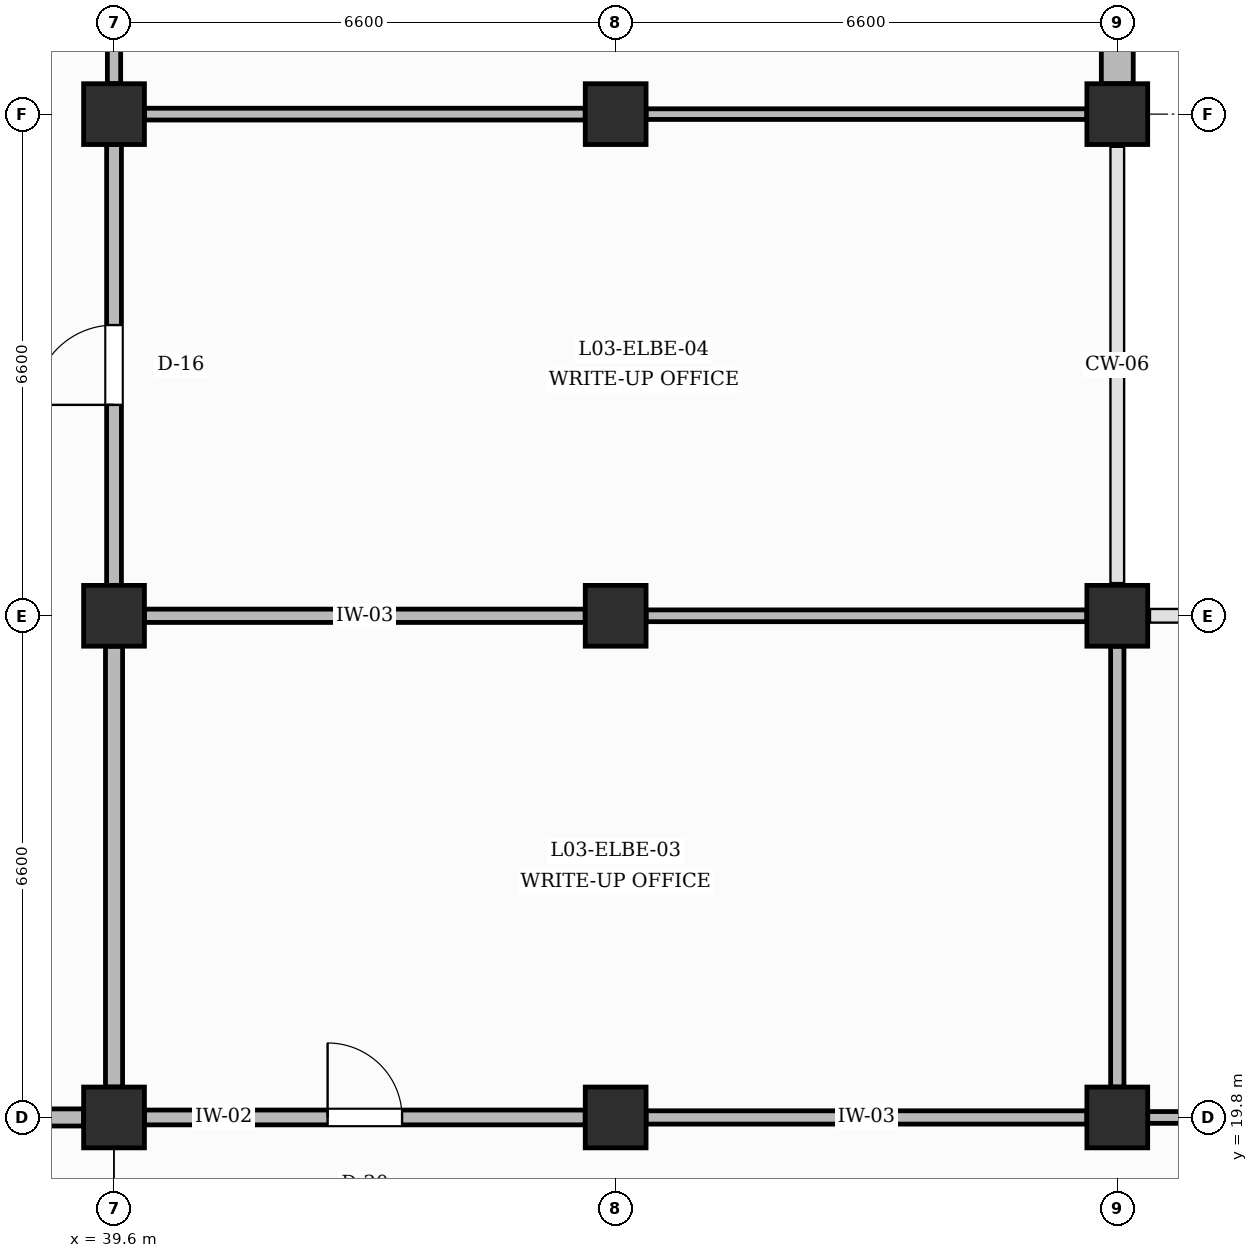
"""IFC4 building model, lengths in metres.
Left out: names, types, materials, properties, quantities, classifications, styles, units other than length and angle.
Written with IfcOpenShell. Run it as: python <this file> out.ifc"""

import sys

from ifc_helpers import new_model, si_unit, direction, frame, frame_2d, origin, origin_2d, place, context, subcontext, project, spatial, rectangle, extrude, element, fill, save


model = new_model("IFC4")
c1 = context("Model", 3, precision=1e-05, world=origin(), true_north=direction((0.0, 1.0)))
c2 = subcontext(c1, "Body", "Model", "MODEL_VIEW")
j1 = project(units=[si_unit("LENGTHUNIT", "METRE"), si_unit("PLANEANGLEUNIT", "RADIAN")], contexts=[c1])
p1 = place(None, origin())
s1 = spatial("IfcSite", under=j1, at=p1, CompositionType="ELEMENT")
p2 = place(p1, origin())
s2 = spatial("IfcBuilding", under=s1, at=p2, CompositionType="ELEMENT")
p3 = place(p2, frame((0.0, 0.0, 14.4)))
s3 = spatial("IfcBuildingStorey", under=s2, at=p3, CompositionType="ELEMENT", Elevation=14.4)
for number, where, z_axis, x_axis in (
    (1, (39.6, 19.8, 0.0), (0.0, 0.0, 1.0), (1.0, 0.0, 0.0)),
    (2, (39.6, 26.4, 0.0), (0.0, 0.0, 1.0), (1.0, 0.0, 0.0)),
    (3, (39.6, 33.0, 0.0), (0.0, 0.0, 1.0), (1.0, 0.0, 0.0)),
    (4, (46.2, 19.8, 0.0), (0.0, 0.0, 1.0), (1.0, 0.0, 0.0)),
    (5, (46.2, 26.4, 0.0), (0.0, 0.0, 1.0), (1.0, 0.0, 0.0)),
    (6, (46.2, 33.0, 0.0), (0.0, 0.0, 1.0), (1.0, 0.0, 0.0)),
    (7, (52.8, 19.8, 0.0), (0.0, 0.0, 1.0), (1.0, 0.0, 0.0)),
    (8, (52.8, 26.4, 0.0), (0.0, 0.0, 1.0), (1.0, 0.0, 0.0)),
    (9, (52.8, 33.0, 0.0), (0.0, 0.0, 1.0), (1.0, 0.0, 0.0)),
):
    element("IfcColumn", number, at=place(p3, frame(where, z_axis=z_axis, x_axis=x_axis)), inside=s3, PredefinedType="COLUMN", context=c2, shape_type="SweptSolid", body=[
        extrude(rectangle(XDim=0.8, YDim=0.8, at=origin_2d()), origin(), (0.0, 0.0, 1.0), 4.2),
    ])
p4 = place(p3, frame((52.8, 33.4, 0.0), z_axis=(0.0, 0.0, 1.0), x_axis=(0.0, 1.0, 0.0)))
e10 = element("IfcWall", 10, at=p4, inside=s3, PredefinedType="SOLIDWALL", context=c2, shape_type="SweptSolid", body=[
    extrude(rectangle(XDim=5.8, YDim=0.42, at=frame_2d((2.9, 0.0))), origin(), (0.0, 0.0, 1.0), 3.26),
])
p5 = place(p4, frame((1.69, 0.0, 0.95)))
e11 = element("IfcOpeningElement", 11, at=p5, cuts=e10, PredefinedType="OPENING", context=c2, shape_type="SweptSolid", body=[
    extrude(rectangle(XDim=2.42, YDim=1.68, at=frame_2d((1.21, 0.84))), frame((0.0, 0.22, 0.0), z_axis=(0.0, -1.0, 0.0), x_axis=(1.0, 0.0, 0.0)), (0.0, 0.0, 1.0), 0.44),
])
p6 = place(p3, frame((33.425, 19.8, 0.0), z_axis=(0.0, 0.0, 1.0), x_axis=(1.0, 0.0, 0.0)))
e12 = element("IfcWall", 12, at=p6, inside=s3, PredefinedType="PARTITIONING", context=c2, shape_type="SweptSolid", body=[
    extrude(rectangle(XDim=5.775, YDim=0.225, at=frame_2d((2.887, 0.0))), origin(), (0.0, 0.0, 1.0), 3.16),
])
p7 = place(p6, frame((2.075, 0.0, 0.0)))
e13 = element("IfcOpeningElement", 13, at=p7, cuts=e12, PredefinedType="OPENING", context=c2, shape_type="SweptSolid", body=[
    extrude(rectangle(XDim=1.6, YDim=2.2, at=frame_2d((0.8, 1.1))), frame((0.0, 0.123, 0.0), z_axis=(0.0, -1.0, 0.0), x_axis=(1.0, 0.0, 0.0)), (0.0, 0.0, 1.0), 0.245),
])
p8 = place(p3, frame((39.6, 20.2, 0.0), z_axis=(0.0, 0.0, 1.0), x_axis=(0.0, 1.0, 0.0)))
e14 = element("IfcWall", 14, at=p8, inside=s3, PredefinedType="PARTITIONING", context=c2, shape_type="SweptSolid", body=[
    extrude(rectangle(XDim=5.8, YDim=0.225, at=frame_2d((2.9, 0.0))), origin(), (0.0, 0.0, 1.0), 3.16),
])
p9 = place(p3, frame((39.6, 26.8, 0.0), z_axis=(0.0, 0.0, 1.0), x_axis=(0.0, 1.0, 0.0)))
e15 = element("IfcWall", 15, at=p9, inside=s3, PredefinedType="PARTITIONING", context=c2, shape_type="SweptSolid", body=[
    extrude(rectangle(XDim=5.8, YDim=0.195, at=frame_2d((2.9, 0.0))), origin(), (0.0, 0.0, 1.0), 3.16),
])
p10 = place(p9, frame((2.375, 0.0, 0.0)))
e16 = element("IfcOpeningElement", 16, at=p10, cuts=e15, PredefinedType="OPENING", context=c2, shape_type="SweptSolid", body=[
    extrude(rectangle(XDim=1.05, YDim=2.15, at=frame_2d((0.525, 1.075))), frame((0.0, 0.107, 0.0), z_axis=(0.0, -1.0, 0.0), x_axis=(1.0, 0.0, 0.0)), (0.0, 0.0, 1.0), 0.215),
])
p11 = place(p3, frame((39.6, 33.4, 0.0), z_axis=(0.0, 0.0, 1.0), x_axis=(0.0, 1.0, 0.0)))
e17 = element("IfcWall", 17, at=p11, inside=s3, PredefinedType="PARTITIONING", context=c2, shape_type="SweptSolid", body=[
    extrude(rectangle(XDim=5.8, YDim=0.175, at=frame_2d((2.9, 0.0))), origin(), (0.0, 0.0, 1.0), 3.16),
])
p12 = place(p11, frame((2.36, 0.0, 0.0)))
e18 = element("IfcOpeningElement", 18, at=p12, cuts=e17, PredefinedType="OPENING", context=c2, shape_type="SweptSolid", body=[
    extrude(rectangle(XDim=1.08, YDim=2.15, at=frame_2d((0.54, 1.075))), frame((0.0, 0.097, 0.0), z_axis=(0.0, -1.0, 0.0), x_axis=(1.0, 0.0, 0.0)), (0.0, 0.0, 1.0), 0.195),
])
p13 = place(p3, frame((40.0, 19.8, 0.0), z_axis=(0.0, 0.0, 1.0), x_axis=(1.0, 0.0, 0.0)))
e19 = element("IfcWall", 19, at=p13, inside=s3, PredefinedType="PARTITIONING", context=c2, shape_type="SweptSolid", body=[
    extrude(rectangle(XDim=5.8, YDim=0.195, at=frame_2d((2.9, 0.0))), origin(), (0.0, 0.0, 1.0), 3.16),
])
p14 = place(p13, frame((2.41, 0.0, 0.0)))
e20 = element("IfcOpeningElement", 20, at=p14, cuts=e19, PredefinedType="OPENING", context=c2, shape_type="SweptSolid", body=[
    extrude(rectangle(XDim=0.98, YDim=2.15, at=frame_2d((0.49, 1.075))), frame((0.0, 0.107, 0.0), z_axis=(0.0, -1.0, 0.0), x_axis=(1.0, 0.0, 0.0)), (0.0, 0.0, 1.0), 0.215),
])
p15 = place(p3, frame((40.0, 26.4, 0.0), z_axis=(0.0, 0.0, 1.0), x_axis=(1.0, 0.0, 0.0)))
e21 = element("IfcWall", 21, at=p15, inside=s3, PredefinedType="PARTITIONING", context=c2, shape_type="SweptSolid", body=[
    extrude(rectangle(XDim=5.8, YDim=0.175, at=frame_2d((2.9, 0.0))), origin(), (0.0, 0.0, 1.0), 3.16),
])
p16 = place(p3, frame((40.0, 33.0, 0.0), z_axis=(0.0, 0.0, 1.0), x_axis=(1.0, 0.0, 0.0)))
e22 = element("IfcWall", 22, at=p16, inside=s3, PredefinedType="PARTITIONING", context=c2, shape_type="SweptSolid", body=[
    extrude(rectangle(XDim=5.8, YDim=0.155, at=frame_2d((2.9, 0.0))), origin(), (0.0, 0.0, 1.0), 3.16),
])
p17 = place(p3, frame((46.6, 19.8, 0.0), z_axis=(0.0, 0.0, 1.0), x_axis=(1.0, 0.0, 0.0)))
e23 = element("IfcWall", 23, at=p17, inside=s3, PredefinedType="PARTITIONING", context=c2, shape_type="SweptSolid", body=[
    extrude(rectangle(XDim=5.8, YDim=0.175, at=frame_2d((2.9, 0.0))), origin(), (0.0, 0.0, 1.0), 3.16),
])
p18 = place(p3, frame((52.8, 20.2, 0.0), z_axis=(0.0, 0.0, 1.0), x_axis=(0.0, 1.0, 0.0)))
e24 = element("IfcWall", 24, at=p18, inside=s3, PredefinedType="PARTITIONING", context=c2, shape_type="SweptSolid", body=[
    extrude(rectangle(XDim=5.8, YDim=0.175, at=frame_2d((2.9, 0.0))), origin(), (0.0, 0.0, 1.0), 3.16),
])
p19 = place(p3, frame((46.6, 26.4, 0.0), z_axis=(0.0, 0.0, 1.0), x_axis=(1.0, 0.0, 0.0)))
e25 = element("IfcWall", 25, at=p19, inside=s3, PredefinedType="PARTITIONING", context=c2, shape_type="SweptSolid", body=[
    extrude(rectangle(XDim=5.8, YDim=0.155, at=frame_2d((2.9, 0.0))), origin(), (0.0, 0.0, 1.0), 3.16),
])
p20 = place(p3, frame((46.6, 33.0, 0.0), z_axis=(0.0, 0.0, 1.0), x_axis=(1.0, 0.0, 0.0)))
e26 = element("IfcWall", 26, at=p20, inside=s3, PredefinedType="PARTITIONING", context=c2, shape_type="SweptSolid", body=[
    extrude(rectangle(XDim=5.8, YDim=0.14, at=frame_2d((2.9, 0.0))), origin(), (0.0, 0.0, 1.0), 3.16),
])
p21 = place(p3, frame((53.2, 19.8, 0.0), z_axis=(0.0, 0.0, 1.0), x_axis=(1.0, 0.0, 0.0)))
e27 = element("IfcWall", 27, at=p21, inside=s3, PredefinedType="PARTITIONING", context=c2, shape_type="SweptSolid", body=[
    extrude(rectangle(XDim=5.8, YDim=0.155, at=frame_2d((2.9, 0.0))), origin(), (0.0, 0.0, 1.0), 3.16),
])
p22 = place(p21, frame((2.25, 0.0, 0.0)))
e28 = element("IfcOpeningElement", 28, at=p22, cuts=e27, PredefinedType="OPENING", context=c2, shape_type="SweptSolid", body=[
    extrude(rectangle(XDim=1.3, YDim=2.3, at=frame_2d((0.65, 1.15))), frame((0.0, 0.087, 0.0), z_axis=(0.0, -1.0, 0.0), x_axis=(1.0, 0.0, 0.0)), (0.0, 0.0, 1.0), 0.175),
])
p23 = place(p14, origin())
e29 = element("IfcDoor", 29, at=p23, inside=s3, OperationType="SINGLE_SWING_LEFT", PredefinedType="DOOR", context=c2, shape_type="SweptSolid", body=[
    extrude(rectangle(XDim=0.98, YDim=2.15, at=frame_2d((0.49, 1.075))), frame((0.0, 0.025, 0.0), z_axis=(0.0, -1.0, 0.0), x_axis=(1.0, 0.0, 0.0)), (0.0, 0.0, 1.0), 0.05),
])
fill(e20, e29)
p24 = place(p10, origin())
e30 = element("IfcDoor", 30, at=p24, inside=s3, OperationType="SINGLE_SWING_LEFT", PredefinedType="DOOR", context=c2, shape_type="SweptSolid", body=[
    extrude(rectangle(XDim=1.05, YDim=2.15, at=frame_2d((0.525, 1.075))), frame((0.0, 0.025, 0.0), z_axis=(0.0, -1.0, 0.0), x_axis=(1.0, 0.0, 0.0)), (0.0, 0.0, 1.0), 0.05),
])
fill(e16, e30)
save(model, sys.argv[1])
